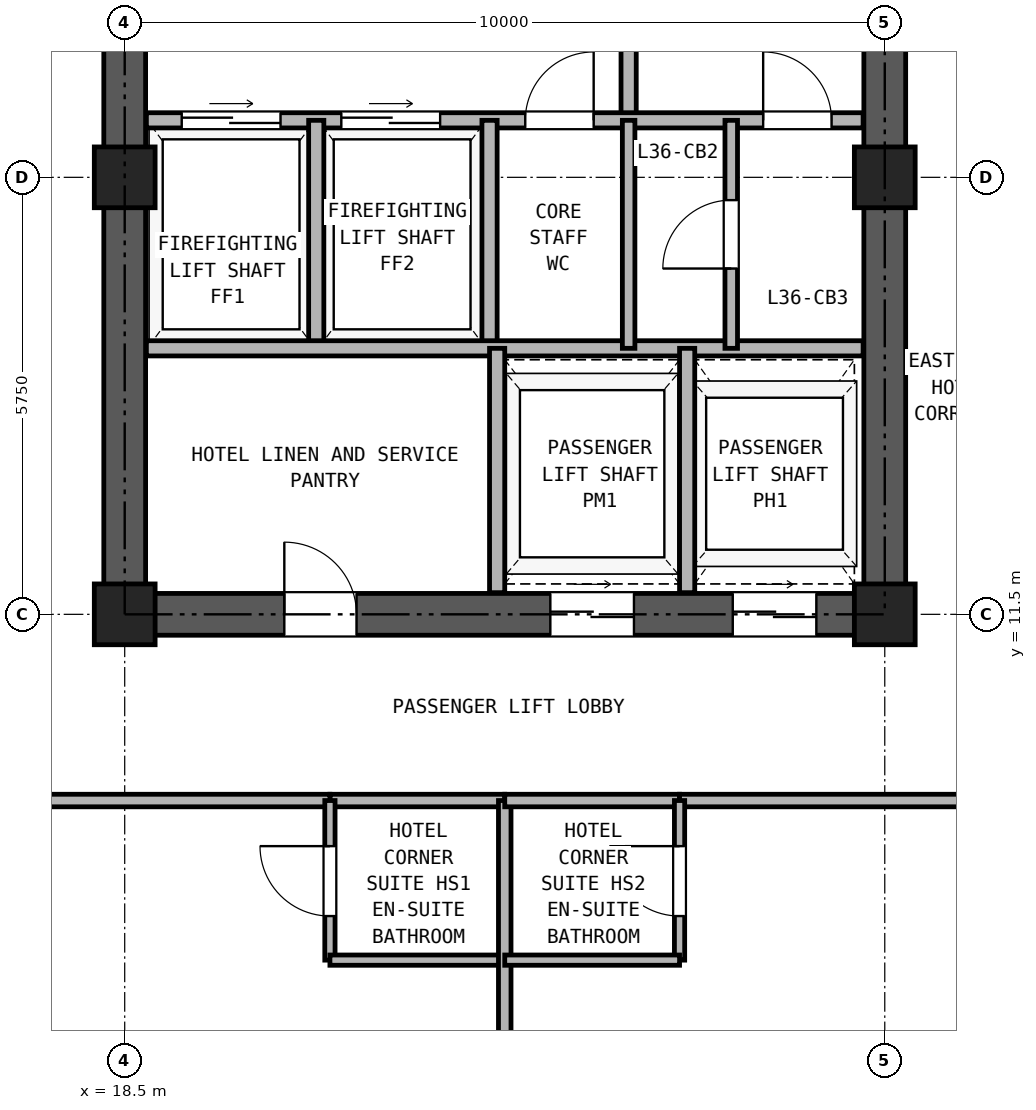
"""IFC4 building model, lengths in metres.
Left out: names, types, materials, properties, quantities, classifications, styles, units other than length and angle.
Written with IfcOpenShell. Run it as: python <this file> out.ifc"""

import sys

from ifc_helpers import new_model, si_unit, direction, frame, frame_2d, origin, origin_2d, place, context, subcontext, project, spatial, rectangle, hollow_rectangle, extrude, source, transform, mapped, element, fill, save


model = new_model("IFC4")
c1 = context("Model", 3, precision=1e-05, world=origin(), true_north=direction((0.0, 1.0)))
c2 = subcontext(c1, "Body", "Model", "MODEL_VIEW")
j1 = project(units=[si_unit("LENGTHUNIT", "METRE"), si_unit("PLANEANGLEUNIT", "RADIAN")], contexts=[c1])
p1 = place(None, origin())
s1 = spatial("IfcSite", under=j1, at=p1, CompositionType="ELEMENT")
p2 = place(p1, origin())
s2 = spatial("IfcBuilding", under=s1, at=p2, CompositionType="ELEMENT")
p3 = place(p2, frame((0.0, 0.0, 131.1)))
s3 = spatial("IfcBuildingStorey", under=s2, at=p3, CompositionType="ELEMENT", Elevation=131.1)
m1 = source(origin(), c2, "Body", "SweptSolid", [
    extrude(hollow_rectangle(XDim=0.8, YDim=0.8, WallThickness=0.045, at=origin_2d()), origin(), (0.0, 0.0, 1.0), 2.95),
])
for number, where, z_axis, x_axis in (
    (1, (18.5, 11.5, 0.0), (0.0, 0.0, 1.0), (1.0, 0.0, 0.0)),
    (2, (18.5, 17.25, 0.0), (0.0, 0.0, 1.0), (1.0, 0.0, 0.0)),
    (3, (28.5, 11.5, 0.0), (0.0, 0.0, 1.0), (1.0, 0.0, 0.0)),
    (4, (28.5, 17.25, 0.0), (0.0, 0.0, 1.0), (1.0, 0.0, 0.0)),
):
    element("IfcColumn", number, at=place(p3, frame(where, z_axis=z_axis, x_axis=x_axis)), inside=s3, PredefinedType="COLUMN", context=c2, shape_type="MappedRepresentation", body=[
        mapped(m1, transform((0.0, 0.0, 0.0), x_axis=(1.0, 0.0, 0.0), y_axis=(0.0, 1.0, 0.0), z_axis=(0.0, 0.0, 1.0), scale=1.0)),
    ])
p4 = place(p3, frame((18.225, 11.5, 0.0), z_axis=(0.0, 0.0, 1.0), x_axis=(1.0, 0.0, 0.0)))
e5 = element("IfcWall", 5, at=p4, inside=s3, PredefinedType="SHEAR", context=c2, shape_type="SweptSolid", body=[
    extrude(rectangle(XDim=10.55, YDim=0.55, at=frame_2d((5.275, 0.0))), origin(), (0.0, 0.0, 1.0), 2.95),
])
p5 = place(p4, frame((2.375, 0.0, 0.0)))
e6 = element("IfcOpeningElement", 6, at=p5, cuts=e5, PredefinedType="OPENING", context=c2, shape_type="SweptSolid", body=[
    extrude(rectangle(XDim=0.95, YDim=2.15, at=frame_2d((0.475, 1.075))), frame((0.0, 0.285, 0.0), z_axis=(0.0, -1.0, 0.0), x_axis=(1.0, 0.0, 0.0)), (0.0, 0.0, 1.0), 0.57),
])
p6 = place(p4, frame((5.875, 0.0, 0.0)))
e7 = element("IfcOpeningElement", 7, at=p6, cuts=e5, PredefinedType="OPENING", context=c2, shape_type="SweptSolid", body=[
    extrude(rectangle(XDim=1.1, YDim=2.25, at=frame_2d((0.55, 1.125))), frame((0.0, 0.285, 0.0), z_axis=(0.0, -1.0, 0.0), x_axis=(1.0, 0.0, 0.0)), (0.0, 0.0, 1.0), 0.57),
])
p7 = place(p4, frame((8.275, 0.0, 0.0)))
e8 = element("IfcOpeningElement", 8, at=p7, cuts=e5, PredefinedType="OPENING", context=c2, shape_type="SweptSolid", body=[
    extrude(rectangle(XDim=1.1, YDim=2.25, at=frame_2d((0.55, 1.125))), frame((0.0, 0.285, 0.0), z_axis=(0.0, -1.0, 0.0), x_axis=(1.0, 0.0, 0.0)), (0.0, 0.0, 1.0), 0.57),
])
p8 = place(p3, frame((18.5, 11.775, 0.0), z_axis=(0.0, 0.0, 1.0), x_axis=(0.0, 1.0, 0.0)))
e9 = element("IfcWall", 9, at=p8, inside=s3, PredefinedType="SHEAR", context=c2, shape_type="SweptSolid", body=[
    extrude(rectangle(XDim=16.7, YDim=0.55, at=frame_2d((8.35, 0.0))), origin(), (0.0, 0.0, 1.0), 2.95),
])
p9 = place(p8, frame((7.375, 0.0, 0.0)))
e10 = element("IfcOpeningElement", 10, at=p9, cuts=e9, PredefinedType="OPENING", context=c2, shape_type="SweptSolid", body=[
    extrude(rectangle(XDim=1.15, YDim=2.2, at=frame_2d((0.575, 1.1))), frame((0.0, 0.285, 0.0), z_axis=(0.0, -1.0, 0.0), x_axis=(1.0, 0.0, 0.0)), (0.0, 0.0, 1.0), 0.57),
])
p10 = place(p3, frame((28.5, 11.775, 0.0), z_axis=(0.0, 0.0, 1.0), x_axis=(0.0, 1.0, 0.0)))
e11 = element("IfcWall", 11, at=p10, inside=s3, PredefinedType="SHEAR", context=c2, shape_type="SweptSolid", body=[
    extrude(rectangle(XDim=16.7, YDim=0.55, at=frame_2d((8.35, 0.0))), origin(), (0.0, 0.0, 1.0), 2.95),
])
p11 = place(p10, frame((7.375, 0.0, 0.0)))
e12 = element("IfcOpeningElement", 12, at=p11, cuts=e11, PredefinedType="OPENING", context=c2, shape_type="SweptSolid", body=[
    extrude(rectangle(XDim=1.15, YDim=2.2, at=frame_2d((0.575, 1.1))), frame((0.0, 0.285, 0.0), z_axis=(0.0, -1.0, 0.0), x_axis=(1.0, 0.0, 0.0)), (0.0, 0.0, 1.0), 0.57),
])
p12 = place(p3, frame((25.13, 18.0, 0.0), z_axis=(0.0, 0.0, 1.0), x_axis=(0.0, 1.0, 0.0)))
e13 = element("IfcWall", 13, at=p12, inside=s3, PredefinedType="PARTITIONING", context=c2, shape_type="SweptSolid", body=[
    extrude(rectangle(XDim=3.39, YDim=0.2, at=frame_2d((1.695, 0.0))), origin(), (0.0, 0.0, 1.0), 2.95),
])
p13 = place(p12, frame((1.1, 0.0, 0.0)))
e14 = element("IfcOpeningElement", 14, at=p13, cuts=e13, PredefinedType="OPENING", context=c2, shape_type="SweptSolid", body=[
    extrude(rectangle(XDim=1.15, YDim=2.2, at=frame_2d((0.575, 1.1))), frame((0.0, 0.11, 0.0), z_axis=(0.0, -1.0, 0.0), x_axis=(1.0, 0.0, 0.0)), (0.0, 0.0, 1.0), 0.22),
])
p14 = place(p3, frame((18.785, 18.0, 0.0), z_axis=(0.0, 0.0, 1.0), x_axis=(1.0, 0.0, 0.0)))
e15 = element("IfcWall", 15, at=p14, inside=s3, PredefinedType="PARTITIONING", context=c2, shape_type="SweptSolid", body=[
    extrude(rectangle(XDim=9.43, YDim=0.2, at=frame_2d((4.715, 0.0))), origin(), (0.0, 0.0, 1.0), 2.95),
])
p15 = place(p14, frame((0.465, 0.0, 0.0)))
e16 = element("IfcOpeningElement", 16, at=p15, cuts=e15, PredefinedType="OPENING", context=c2, shape_type="SweptSolid", body=[
    extrude(rectangle(XDim=1.3, YDim=2.3, at=frame_2d((0.65, 1.15))), frame((0.0, 0.11, 0.0), z_axis=(0.0, -1.0, 0.0), x_axis=(1.0, 0.0, 0.0)), (0.0, 0.0, 1.0), 0.22),
])
p16 = place(p14, frame((2.565, 0.0, 0.0)))
e17 = element("IfcOpeningElement", 17, at=p16, cuts=e15, PredefinedType="OPENING", context=c2, shape_type="SweptSolid", body=[
    extrude(rectangle(XDim=1.3, YDim=2.3, at=frame_2d((0.65, 1.15))), frame((0.0, 0.11, 0.0), z_axis=(0.0, -1.0, 0.0), x_axis=(1.0, 0.0, 0.0)), (0.0, 0.0, 1.0), 0.22),
])
p17 = place(p14, frame((4.985, 0.0, 0.0)))
e18 = element("IfcOpeningElement", 18, at=p17, cuts=e15, PredefinedType="OPENING", context=c2, shape_type="SweptSolid", body=[
    extrude(rectangle(XDim=0.9, YDim=2.05, at=frame_2d((0.45, 1.025))), frame((0.0, 0.11, 0.0), z_axis=(0.0, -1.0, 0.0), x_axis=(1.0, 0.0, 0.0)), (0.0, 0.0, 1.0), 0.22),
])
p18 = place(p14, frame((8.115, 0.0, 0.0)))
e19 = element("IfcOpeningElement", 19, at=p18, cuts=e15, PredefinedType="OPENING", context=c2, shape_type="SweptSolid", body=[
    extrude(rectangle(XDim=0.9, YDim=2.05, at=frame_2d((0.45, 1.025))), frame((0.0, 0.11, 0.0), z_axis=(0.0, -1.0, 0.0), x_axis=(1.0, 0.0, 0.0)), (0.0, 0.0, 1.0), 0.22),
])
for number, where, z_axis, x_axis in (
    (20, (21.02, 15.0, 0.0), (0.0, 0.0, 1.0), (0.0, 1.0, 0.0)),
    (21, (23.3, 15.0, 0.0), (0.0, 0.0, 1.0), (0.0, 1.0, 0.0)),
):
    element("IfcWall", number, at=place(p3, frame(where, z_axis=z_axis, x_axis=x_axis)), inside=s3, PredefinedType="PARTITIONING", context=c2, shape_type="SweptSolid", body=[
        extrude(rectangle(XDim=3.0, YDim=0.2, at=frame_2d((1.5, 0.0))), origin(), (0.0, 0.0, 1.0), 2.95),
    ])
p19 = place(p3, frame((18.785, 15.0, 0.0), z_axis=(0.0, 0.0, 1.0), x_axis=(1.0, 0.0, 0.0)))
e22 = element("IfcWall", 22, at=p19, inside=s3, PredefinedType="PARTITIONING", context=c2, shape_type="SweptSolid", body=[
    extrude(rectangle(XDim=9.43, YDim=0.2, at=frame_2d((4.715, 0.0))), origin(), (0.0, 0.0, 1.0), 2.95),
])
p20 = place(p3, frame((25.13, 15.0, 0.0), z_axis=(0.0, 0.0, 1.0), x_axis=(0.0, 1.0, 0.0)))
e23 = element("IfcWall", 23, at=p20, inside=s3, PredefinedType="PARTITIONING", context=c2, shape_type="SweptSolid", body=[
    extrude(rectangle(XDim=3.0, YDim=0.165, at=frame_2d((1.5, 0.0))), origin(), (0.0, 0.0, 1.0), 2.95),
])
p21 = place(p3, frame((26.48, 15.0, 0.0), z_axis=(0.0, 0.0, 1.0), x_axis=(0.0, 1.0, 0.0)))
e24 = element("IfcWall", 24, at=p21, inside=s3, PredefinedType="PARTITIONING", context=c2, shape_type="SweptSolid", body=[
    extrude(rectangle(XDim=3.0, YDim=0.165, at=frame_2d((1.5, 0.0))), origin(), (0.0, 0.0, 1.0), 2.95),
])
p22 = place(p21, frame((1.05, 0.0, 0.0)))
e25 = element("IfcOpeningElement", 25, at=p22, cuts=e24, PredefinedType="OPENING", context=c2, shape_type="SweptSolid", body=[
    extrude(rectangle(XDim=0.9, YDim=2.05, at=frame_2d((0.45, 1.025))), frame((0.0, 0.093, 0.0), z_axis=(0.0, -1.0, 0.0), x_axis=(1.0, 0.0, 0.0)), (0.0, 0.0, 1.0), 0.185),
])
for number, where, z_axis, x_axis in (
    (26, (23.4, 11.785, 0.0), (0.0, 0.0, 1.0), (0.0, 1.0, 0.0)),
    (27, (25.9, 11.785, 0.0), (0.0, 0.0, 1.0), (0.0, 1.0, 0.0)),
):
    element("IfcWall", number, at=place(p3, frame(where, z_axis=z_axis, x_axis=x_axis)), inside=s3, PredefinedType="PARTITIONING", context=c2, shape_type="SweptSolid", body=[
        extrude(rectangle(XDim=3.215, YDim=0.2, at=frame_2d((1.607, 0.0))), origin(), (0.0, 0.0, 1.0), 2.95),
    ])
p23 = place(p3, frame((21.2, 9.05, 0.0), z_axis=(0.0, 0.0, 1.0), x_axis=(1.0, 0.0, 0.0)))
e28 = element("IfcWall", 28, at=p23, inside=s3, PredefinedType="PARTITIONING", context=c2, shape_type="SweptSolid", body=[
    extrude(rectangle(XDim=2.3, YDim=0.165, at=frame_2d((1.15, 0.0))), origin(), (0.0, 0.0, 1.0), 2.95),
])
p24 = place(p3, frame((6.6, 9.05, 0.0), z_axis=(0.0, 0.0, 1.0), x_axis=(1.0, 0.0, 0.0)))
e29 = element("IfcWall", 29, at=p24, inside=s3, PredefinedType="PARTITIONING", context=c2, shape_type="SweptSolid", body=[
    extrude(rectangle(XDim=14.6, YDim=0.165, at=frame_2d((7.3, 0.0))), origin(), (0.0, 0.0, 1.0), 2.95),
])
p25 = place(p24, frame((6.8, 0.0, 0.0)))
e30 = element("IfcOpeningElement", 30, at=p25, cuts=e29, PredefinedType="OPENING", context=c2, shape_type="SweptSolid", body=[
    extrude(rectangle(XDim=1.0, YDim=2.15, at=frame_2d((0.5, 1.075))), frame((0.0, 0.093, 0.0), z_axis=(0.0, -1.0, 0.0), x_axis=(1.0, 0.0, 0.0)), (0.0, 0.0, 1.0), 0.185),
])
p26 = place(p3, frame((21.2, 6.95, 0.0), z_axis=(0.0, 0.0, 1.0), x_axis=(0.0, 1.0, 0.0)))
e31 = element("IfcWall", 31, at=p26, inside=s3, PredefinedType="PARTITIONING", context=c2, shape_type="SweptSolid", body=[
    extrude(rectangle(XDim=2.1, YDim=0.135, at=frame_2d((1.05, 0.0))), origin(), (0.0, 0.0, 1.0), 2.95),
])
p27 = place(p26, frame((0.58, 0.0, 0.0)))
e32 = element("IfcOpeningElement", 32, at=p27, cuts=e31, PredefinedType="OPENING", context=c2, shape_type="SweptSolid", body=[
    extrude(rectangle(XDim=0.92, YDim=2.1, at=frame_2d((0.46, 1.05))), frame((0.0, 0.077, 0.0), z_axis=(0.0, -1.0, 0.0), x_axis=(1.0, 0.0, 0.0)), (0.0, 0.0, 1.0), 0.155),
])
p28 = place(p3, frame((21.2, 6.95, 0.0), z_axis=(0.0, 0.0, 1.0), x_axis=(1.0, 0.0, 0.0)))
e33 = element("IfcWall", 33, at=p28, inside=s3, PredefinedType="PARTITIONING", context=c2, shape_type="SweptSolid", body=[
    extrude(rectangle(XDim=2.3, YDim=0.135, at=frame_2d((1.15, 0.0))), origin(), (0.0, 0.0, 1.0), 2.95),
])
p29 = place(p3, frame((23.5, 0.16, 0.0), z_axis=(0.0, 0.0, 1.0), x_axis=(0.0, 1.0, 0.0)))
e34 = element("IfcWall", 34, at=p29, inside=s3, PredefinedType="PARTITIONING", context=c2, shape_type="SweptSolid", body=[
    extrude(rectangle(XDim=8.89, YDim=0.165, at=frame_2d((4.445, 0.0))), origin(), (0.0, 0.0, 1.0), 2.95),
])
p30 = place(p3, frame((23.5, 9.05, 0.0), z_axis=(0.0, 0.0, 1.0), x_axis=(1.0, 0.0, 0.0)))
e35 = element("IfcWall", 35, at=p30, inside=s3, PredefinedType="PARTITIONING", context=c2, shape_type="SweptSolid", body=[
    extrude(rectangle(XDim=2.3, YDim=0.165, at=frame_2d((1.15, 0.0))), origin(), (0.0, 0.0, 1.0), 2.95),
])
p31 = place(p3, frame((25.8, 9.05, 0.0), z_axis=(0.0, 0.0, 1.0), x_axis=(1.0, 0.0, 0.0)))
e36 = element("IfcWall", 36, at=p31, inside=s3, PredefinedType="PARTITIONING", context=c2, shape_type="SweptSolid", body=[
    extrude(rectangle(XDim=14.6, YDim=0.165, at=frame_2d((7.3, 0.0))), origin(), (0.0, 0.0, 1.0), 2.95),
])
p32 = place(p31, frame((6.8, 0.0, 0.0)))
e37 = element("IfcOpeningElement", 37, at=p32, cuts=e36, PredefinedType="OPENING", context=c2, shape_type="SweptSolid", body=[
    extrude(rectangle(XDim=1.0, YDim=2.15, at=frame_2d((0.5, 1.075))), frame((0.0, 0.093, 0.0), z_axis=(0.0, -1.0, 0.0), x_axis=(1.0, 0.0, 0.0)), (0.0, 0.0, 1.0), 0.185),
])
p33 = place(p3, frame((25.8, 6.95, 0.0), z_axis=(0.0, 0.0, 1.0), x_axis=(0.0, 1.0, 0.0)))
e38 = element("IfcWall", 38, at=p33, inside=s3, PredefinedType="PARTITIONING", context=c2, shape_type="SweptSolid", body=[
    extrude(rectangle(XDim=2.1, YDim=0.135, at=frame_2d((1.05, 0.0))), origin(), (0.0, 0.0, 1.0), 2.95),
])
p34 = place(p33, frame((0.58, 0.0, 0.0)))
e39 = element("IfcOpeningElement", 39, at=p34, cuts=e38, PredefinedType="OPENING", context=c2, shape_type="SweptSolid", body=[
    extrude(rectangle(XDim=0.92, YDim=2.1, at=frame_2d((0.46, 1.05))), frame((0.0, 0.077, 0.0), z_axis=(0.0, -1.0, 0.0), x_axis=(1.0, 0.0, 0.0)), (0.0, 0.0, 1.0), 0.155),
])
p35 = place(p3, frame((23.5, 6.95, 0.0), z_axis=(0.0, 0.0, 1.0), x_axis=(1.0, 0.0, 0.0)))
e40 = element("IfcWall", 40, at=p35, inside=s3, PredefinedType="PARTITIONING", context=c2, shape_type="SweptSolid", body=[
    extrude(rectangle(XDim=2.3, YDim=0.135, at=frame_2d((1.15, 0.0))), origin(), (0.0, 0.0, 1.0), 2.95),
])
p36 = place(p15, origin())
e41 = element("IfcDoor", 41, at=p36, inside=s3, OperationType="DOUBLE_DOOR_SLIDING", PredefinedType="DOOR", context=c2, shape_type="SweptSolid", body=[
    extrude(rectangle(XDim=1.3, YDim=2.3, at=frame_2d((0.65, 1.15))), frame((0.0, 0.025, 0.0), z_axis=(0.0, -1.0, 0.0), x_axis=(1.0, 0.0, 0.0)), (0.0, 0.0, 1.0), 0.05),
])
fill(e16, e41)
p37 = place(p16, origin())
e42 = element("IfcDoor", 42, at=p37, inside=s3, OperationType="DOUBLE_DOOR_SLIDING", PredefinedType="DOOR", context=c2, shape_type="SweptSolid", body=[
    extrude(rectangle(XDim=1.3, YDim=2.3, at=frame_2d((0.65, 1.15))), frame((0.0, 0.025, 0.0), z_axis=(0.0, -1.0, 0.0), x_axis=(1.0, 0.0, 0.0)), (0.0, 0.0, 1.0), 0.05),
])
fill(e17, e42)
p38 = place(p17, frame((0.9, 0.0, 0.0), z_axis=(0.0, 0.0, 1.0), x_axis=(-1.0, 0.0, 0.0)))
e43 = element("IfcDoor", 43, at=p38, inside=s3, OperationType="SINGLE_SWING_RIGHT", PredefinedType="DOOR", context=c2, shape_type="SweptSolid", body=[
    extrude(rectangle(XDim=0.9, YDim=2.05, at=frame_2d((0.45, 1.025))), frame((0.0, 0.025, 0.0), z_axis=(0.0, -1.0, 0.0), x_axis=(1.0, 0.0, 0.0)), (0.0, 0.0, 1.0), 0.05),
])
fill(e18, e43)
p39 = place(p22, origin())
e44 = element("IfcDoor", 44, at=p39, inside=s3, OperationType="SINGLE_SWING_LEFT", PredefinedType="DOOR", context=c2, shape_type="SweptSolid", body=[
    extrude(rectangle(XDim=0.9, YDim=2.05, at=frame_2d((0.45, 1.025))), frame((0.0, 0.025, 0.0), z_axis=(0.0, -1.0, 0.0), x_axis=(1.0, 0.0, 0.0)), (0.0, 0.0, 1.0), 0.05),
])
fill(e25, e44)
p40 = place(p18, frame((0.9, 0.0, 0.0), z_axis=(0.0, 0.0, 1.0), x_axis=(-1.0, 0.0, 0.0)))
e45 = element("IfcDoor", 45, at=p40, inside=s3, OperationType="SINGLE_SWING_LEFT", PredefinedType="DOOR", context=c2, shape_type="SweptSolid", body=[
    extrude(rectangle(XDim=0.9, YDim=2.05, at=frame_2d((0.45, 1.025))), frame((0.0, 0.025, 0.0), z_axis=(0.0, -1.0, 0.0), x_axis=(1.0, 0.0, 0.0)), (0.0, 0.0, 1.0), 0.05),
])
fill(e19, e45)
p41 = place(p5, frame((0.95, 0.0, 0.0), z_axis=(0.0, 0.0, 1.0), x_axis=(-1.0, 0.0, 0.0)))
e46 = element("IfcDoor", 46, at=p41, inside=s3, OperationType="SINGLE_SWING_LEFT", PredefinedType="DOOR", context=c2, shape_type="SweptSolid", body=[
    extrude(rectangle(XDim=0.95, YDim=2.15, at=frame_2d((0.475, 1.075))), frame((0.0, 0.025, 0.0), z_axis=(0.0, -1.0, 0.0), x_axis=(1.0, 0.0, 0.0)), (0.0, 0.0, 1.0), 0.05),
])
fill(e6, e46)
p42 = place(p6, frame((1.1, 0.0, 0.0), z_axis=(0.0, 0.0, 1.0), x_axis=(-1.0, 0.0, 0.0)))
e47 = element("IfcDoor", 47, at=p42, inside=s3, OperationType="DOUBLE_DOOR_SLIDING", PredefinedType="DOOR", context=c2, shape_type="SweptSolid", body=[
    extrude(rectangle(XDim=1.1, YDim=2.25, at=frame_2d((0.55, 1.125))), frame((0.0, 0.025, 0.0), z_axis=(0.0, -1.0, 0.0), x_axis=(1.0, 0.0, 0.0)), (0.0, 0.0, 1.0), 0.05),
])
fill(e7, e47)
p43 = place(p7, frame((1.1, 0.0, 0.0), z_axis=(0.0, 0.0, 1.0), x_axis=(-1.0, 0.0, 0.0)))
e48 = element("IfcDoor", 48, at=p43, inside=s3, OperationType="DOUBLE_DOOR_SLIDING", PredefinedType="DOOR", context=c2, shape_type="SweptSolid", body=[
    extrude(rectangle(XDim=1.1, YDim=2.25, at=frame_2d((0.55, 1.125))), frame((0.0, 0.025, 0.0), z_axis=(0.0, -1.0, 0.0), x_axis=(1.0, 0.0, 0.0)), (0.0, 0.0, 1.0), 0.05),
])
fill(e8, e48)
p44 = place(p27, origin())
e49 = element("IfcDoor", 49, at=p44, inside=s3, OperationType="SINGLE_SWING_RIGHT", PredefinedType="DOOR", context=c2, shape_type="SweptSolid", body=[
    extrude(rectangle(XDim=0.92, YDim=2.1, at=frame_2d((0.46, 1.05))), frame((0.0, 0.025, 0.0), z_axis=(0.0, -1.0, 0.0), x_axis=(1.0, 0.0, 0.0)), (0.0, 0.0, 1.0), 0.05),
])
fill(e32, e49)
p45 = place(p34, frame((0.92, 0.0, 0.0), z_axis=(0.0, 0.0, 1.0), x_axis=(-1.0, 0.0, 0.0)))
e50 = element("IfcDoor", 50, at=p45, inside=s3, OperationType="SINGLE_SWING_RIGHT", PredefinedType="DOOR", context=c2, shape_type="SweptSolid", body=[
    extrude(rectangle(XDim=0.92, YDim=2.1, at=frame_2d((0.46, 1.05))), frame((0.0, 0.025, 0.0), z_axis=(0.0, -1.0, 0.0), x_axis=(1.0, 0.0, 0.0)), (0.0, 0.0, 1.0), 0.05),
])
fill(e39, e50)
save(model, sys.argv[1])
